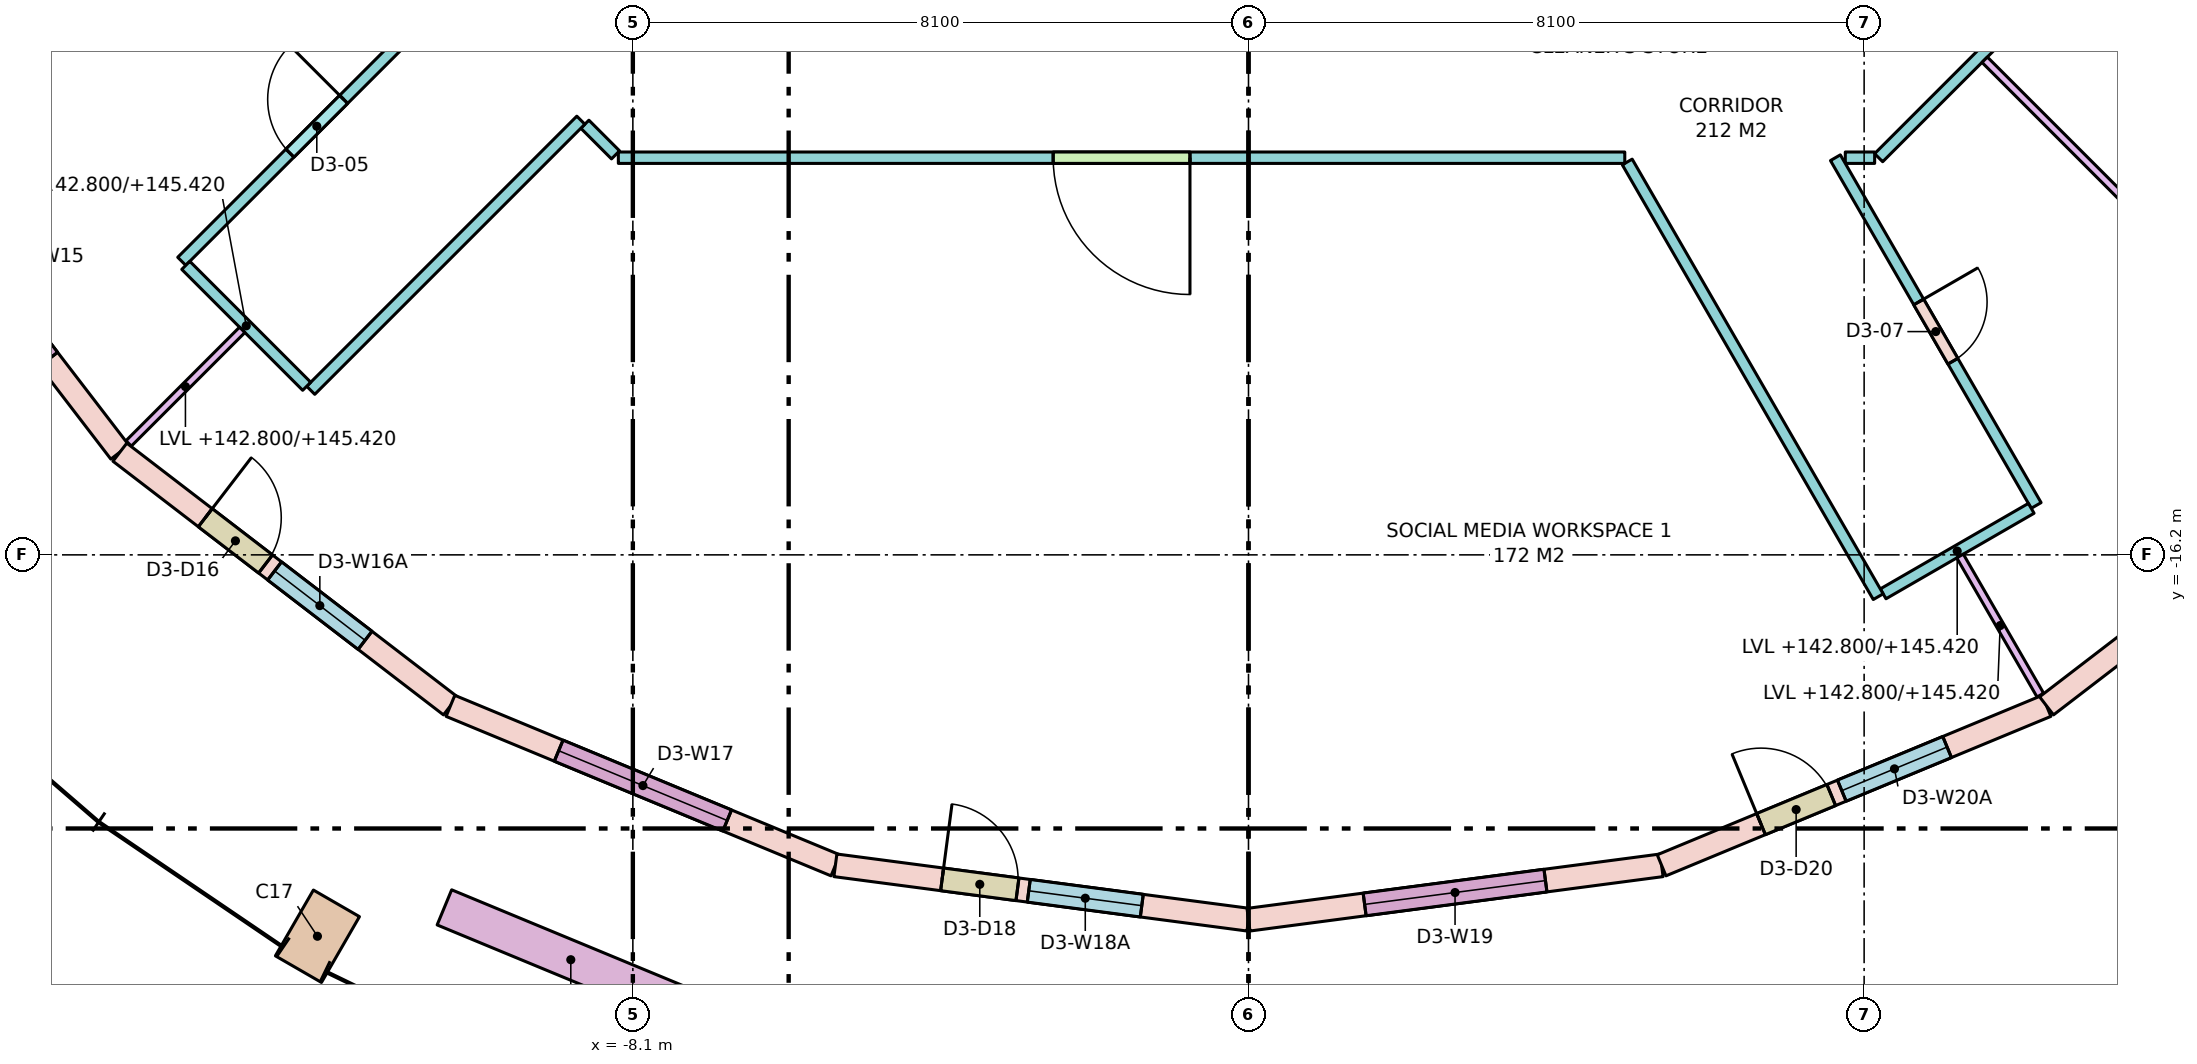
"""IFC4 building model, lengths in metres.
Left out: names, types, materials, properties, quantities, classifications, styles, units other than length and angle.
Written with IfcOpenShell. Run it as: python <this file> out.ifc"""

import sys

from ifc_helpers import new_model, si_unit, direction, frame, frame_2d, origin, origin_2d, place, context, subcontext, project, spatial, rectangle, extrude, element, fill, save


model = new_model("IFC4")
c1 = context("Model", 3, precision=1e-05, world=origin(), true_north=direction((0.0, 1.0)))
c2 = subcontext(c1, "Body", "Model", "MODEL_VIEW")
j1 = project(units=[si_unit("LENGTHUNIT", "METRE"), si_unit("PLANEANGLEUNIT", "RADIAN")], contexts=[c1])
p1 = place(None, origin())
s1 = spatial("IfcSite", under=j1, at=p1, CompositionType="ELEMENT")
p2 = place(p1, origin())
s2 = spatial("IfcBuilding", under=s1, at=p2, CompositionType="ELEMENT")
p3 = place(p2, frame((0.0, 0.0, 142.8)))
s3 = spatial("IfcBuildingStorey", under=s2, at=p3, CompositionType="ELEMENT", Elevation=142.8)
p4 = place(p3, frame((-12.25, -21.218, 0.0), z_axis=(0.0, 0.0, 1.0), x_axis=(0.866025403784, -0.5, 0.0)))
e1 = element("IfcColumn", 1, at=p4, inside=s3, PredefinedType="COLUMN", context=c2, shape_type="SweptSolid", body=[
    extrude(rectangle(XDim=0.7, YDim=1.0, at=origin_2d()), origin(), (0.0, 0.0, 1.0), 3.8),
])
p5 = place(p3, frame((-18.187, -10.5, 0.0), z_axis=(0.0, 0.0, 1.0), x_axis=(0.608784891166, -0.793335336593, 0.0)))
e2 = element("IfcWall", 2, at=p5, inside=s3, PredefinedType="STANDARD", context=c2, shape_type="SweptSolid", body=[
    extrude(rectangle(XDim=5.482, YDim=0.3, at=frame_2d((2.741, 0.0))), origin(), (0.0, 0.0, 1.0), 3.52),
])
p6 = place(p5, frame((1.541, 0.0, 0.8)))
e3 = element("IfcOpeningElement", 3, at=p6, cuts=e2, PredefinedType="OPENING", context=c2, shape_type="SweptSolid", body=[
    extrude(rectangle(XDim=2.4, YDim=2.5, at=frame_2d((1.2, 1.25))), frame((0.0, 0.16, 0.0), z_axis=(0.0, -1.0, 0.0), x_axis=(1.0, 0.0, 0.0)), (0.0, 0.0, 1.0), 0.32),
])
p7 = place(p3, frame((-14.849, -14.849, 0.0), z_axis=(0.0, 0.0, 1.0), x_axis=(0.793335336593, -0.608784891166, 0.0)))
e4 = element("IfcWall", 4, at=p7, inside=s3, PredefinedType="STANDARD", context=c2, shape_type="SweptSolid", body=[
    extrude(rectangle(XDim=5.482, YDim=0.3, at=frame_2d((2.741, 0.0))), origin(), (0.0, 0.0, 1.0), 3.52),
])
p8 = place(p7, frame((1.416, 0.0, 0.0)))
e5 = element("IfcOpeningElement", 5, at=p8, cuts=e4, PredefinedType="OPENING", context=c2, shape_type="SweptSolid", body=[
    extrude(rectangle(XDim=1.0, YDim=2.4, at=frame_2d((0.5, 1.2))), frame((0.0, 0.16, 0.0), z_axis=(0.0, -1.0, 0.0), x_axis=(1.0, 0.0, 0.0)), (0.0, 0.0, 1.0), 0.32),
])
p9 = place(p7, frame((2.566, 0.0, 0.8)))
e6 = element("IfcOpeningElement", 6, at=p9, cuts=e4, PredefinedType="OPENING", context=c2, shape_type="SweptSolid", body=[
    extrude(rectangle(XDim=1.5, YDim=2.5, at=frame_2d((0.75, 1.25))), frame((0.0, 0.16, 0.0), z_axis=(0.0, -1.0, 0.0), x_axis=(1.0, 0.0, 0.0)), (0.0, 0.0, 1.0), 0.32),
])
p10 = place(p3, frame((-10.5, -18.187, 0.0), z_axis=(0.0, 0.0, 1.0), x_axis=(0.923877333662, -0.382688740813, 0.0)))
e7 = element("IfcWall", 7, at=p10, inside=s3, PredefinedType="STANDARD", context=c2, shape_type="SweptSolid", body=[
    extrude(rectangle(XDim=5.482, YDim=0.3, at=frame_2d((2.741, 0.0))), origin(), (0.0, 0.0, 1.0), 3.52),
])
p11 = place(p10, frame((1.541, 0.0, 0.8)))
e8 = element("IfcOpeningElement", 8, at=p11, cuts=e7, PredefinedType="OPENING", context=c2, shape_type="SweptSolid", body=[
    extrude(rectangle(XDim=2.4, YDim=2.5, at=frame_2d((1.2, 1.25))), frame((0.0, 0.16, 0.0), z_axis=(0.0, -1.0, 0.0), x_axis=(1.0, 0.0, 0.0)), (0.0, 0.0, 1.0), 0.32),
])
p12 = place(p3, frame((-5.435, -20.284, 0.0), z_axis=(0.0, 0.0, 1.0), x_axis=(0.991444743541, -0.130527087244, 0.0)))
e9 = element("IfcWall", 9, at=p12, inside=s3, PredefinedType="STANDARD", context=c2, shape_type="SweptSolid", body=[
    extrude(rectangle(XDim=5.482, YDim=0.3, at=frame_2d((2.741, 0.0))), origin(), (0.0, 0.0, 1.0), 3.52),
])
p13 = place(p12, frame((1.416, 0.0, 0.0)))
e10 = element("IfcOpeningElement", 10, at=p13, cuts=e9, PredefinedType="OPENING", context=c2, shape_type="SweptSolid", body=[
    extrude(rectangle(XDim=1.0, YDim=2.4, at=frame_2d((0.5, 1.2))), frame((0.0, 0.16, 0.0), z_axis=(0.0, -1.0, 0.0), x_axis=(1.0, 0.0, 0.0)), (0.0, 0.0, 1.0), 0.32),
])
p14 = place(p12, frame((2.566, 0.0, 0.8)))
e11 = element("IfcOpeningElement", 11, at=p14, cuts=e9, PredefinedType="OPENING", context=c2, shape_type="SweptSolid", body=[
    extrude(rectangle(XDim=1.5, YDim=2.5, at=frame_2d((0.75, 1.25))), frame((0.0, 0.16, 0.0), z_axis=(0.0, -1.0, 0.0), x_axis=(1.0, 0.0, 0.0)), (0.0, 0.0, 1.0), 0.32),
])
p15 = place(p3, frame((0.0, -21.0, 0.0), z_axis=(0.0, 0.0, 1.0), x_axis=(0.991444743541, 0.130527087244, 0.0)))
e12 = element("IfcWall", 12, at=p15, inside=s3, PredefinedType="STANDARD", context=c2, shape_type="SweptSolid", body=[
    extrude(rectangle(XDim=5.482, YDim=0.3, at=frame_2d((2.741, 0.0))), origin(), (0.0, 0.0, 1.0), 3.52),
])
p16 = place(p15, frame((1.541, 0.0, 0.8)))
e13 = element("IfcOpeningElement", 13, at=p16, cuts=e12, PredefinedType="OPENING", context=c2, shape_type="SweptSolid", body=[
    extrude(rectangle(XDim=2.4, YDim=2.5, at=frame_2d((1.2, 1.25))), frame((0.0, 0.16, 0.0), z_axis=(0.0, -1.0, 0.0), x_axis=(1.0, 0.0, 0.0)), (0.0, 0.0, 1.0), 0.32),
])
p17 = place(p3, frame((5.435, -20.284, 0.0), z_axis=(0.0, 0.0, 1.0), x_axis=(0.923877333662, 0.382688740813, 0.0)))
e14 = element("IfcWall", 14, at=p17, inside=s3, PredefinedType="STANDARD", context=c2, shape_type="SweptSolid", body=[
    extrude(rectangle(XDim=5.482, YDim=0.3, at=frame_2d((2.741, 0.0))), origin(), (0.0, 0.0, 1.0), 3.52),
])
p18 = place(p17, frame((1.416, 0.0, 0.0)))
e15 = element("IfcOpeningElement", 15, at=p18, cuts=e14, PredefinedType="OPENING", context=c2, shape_type="SweptSolid", body=[
    extrude(rectangle(XDim=1.0, YDim=2.4, at=frame_2d((0.5, 1.2))), frame((0.0, 0.16, 0.0), z_axis=(0.0, -1.0, 0.0), x_axis=(1.0, 0.0, 0.0)), (0.0, 0.0, 1.0), 0.32),
])
p19 = place(p17, frame((2.566, 0.0, 0.8)))
e16 = element("IfcOpeningElement", 16, at=p19, cuts=e14, PredefinedType="OPENING", context=c2, shape_type="SweptSolid", body=[
    extrude(rectangle(XDim=1.5, YDim=2.5, at=frame_2d((0.75, 1.25))), frame((0.0, 0.16, 0.0), z_axis=(0.0, -1.0, 0.0), x_axis=(1.0, 0.0, 0.0)), (0.0, 0.0, 1.0), 0.32),
])
p20 = place(p3, frame((10.5, -18.187, 0.0), z_axis=(0.0, 0.0, 1.0), x_axis=(0.793335336593, 0.608784891166, 0.0)))
e17 = element("IfcWall", 17, at=p20, inside=s3, PredefinedType="STANDARD", context=c2, shape_type="SweptSolid", body=[
    extrude(rectangle(XDim=5.482, YDim=0.3, at=frame_2d((2.741, 0.0))), origin(), (0.0, 0.0, 1.0), 3.52),
])
p21 = place(p20, frame((1.541, 0.0, 0.8)))
e18 = element("IfcOpeningElement", 18, at=p21, cuts=e17, PredefinedType="OPENING", context=c2, shape_type="SweptSolid", body=[
    extrude(rectangle(XDim=2.4, YDim=2.5, at=frame_2d((1.2, 1.25))), frame((0.0, 0.16, 0.0), z_axis=(0.0, -1.0, 0.0), x_axis=(1.0, 0.0, 0.0)), (0.0, 0.0, 1.0), 0.32),
])
p22 = place(p3, frame((-10.58, -20.838, 0.0), z_axis=(0.0, 0.0, 1.0), x_axis=(0.923909393783, -0.382611332921, 0.0)))
e19 = element("IfcWall", 19, at=p22, inside=s3, PredefinedType="PARAPET", context=c2, shape_type="SweptSolid", body=[
    extrude(rectangle(XDim=3.6, YDim=0.5, at=frame_2d((1.8, 0.0))), origin(), (0.0, 0.0, 1.0), 0.9),
])
p23 = place(p3, frame((-14.035, -12.338, 0.0), z_axis=(0.0, 0.0, 1.0), x_axis=(0.707106781187, 0.707106781187, 0.0)))
e20 = element("IfcWall", 20, at=p23, inside=s3, PredefinedType="PARTITIONING", context=c2, shape_type="SweptSolid", body=[
    extrude(rectangle(XDim=5.026, YDim=0.15, at=frame_2d((2.513, 0.0))), origin(), (0.0, 0.0, 1.0), 3.52),
])
p24 = place(p23, frame((2.013, 0.0, 0.0)))
e21 = element("IfcOpeningElement", 21, at=p24, cuts=e20, PredefinedType="OPENING", context=c2, shape_type="SweptSolid", body=[
    extrude(rectangle(XDim=1.0, YDim=2.1, at=frame_2d((0.5, 1.05))), frame((0.0, 0.085, 0.0), z_axis=(0.0, -1.0, 0.0), x_axis=(1.0, 0.0, 0.0)), (0.0, 0.0, 1.0), 0.17),
])
p25 = place(p3, frame((12.938, -6.328, 0.0), z_axis=(0.0, 0.0, 1.0), x_axis=(-0.707088206597, -0.707125355289, 0.0)))
e22 = element("IfcWall", 22, at=p25, inside=s3, PredefinedType="PARTITIONING", context=c2, shape_type="SweptSolid", body=[
    extrude(rectangle(XDim=6.572, YDim=0.15, at=frame_2d((3.286, 0.0))), origin(), (0.0, 0.0, 1.0), 2.62),
])
p26 = place(p25, frame((2.398, 0.0, 0.0)))
e23 = element("IfcOpeningElement", 23, at=p26, cuts=e22, PredefinedType="OPENING", context=c2, shape_type="SweptSolid", body=[
    extrude(rectangle(XDim=0.9, YDim=2.1, at=frame_2d((0.45, 1.05))), frame((0.0, 0.085, 0.0), z_axis=(0.0, -1.0, 0.0), x_axis=(1.0, 0.0, 0.0)), (0.0, 0.0, 1.0), 0.17),
])
p27 = place(p3, frame((8.238, -10.975, 0.0), z_axis=(0.0, 0.0, 1.0), x_axis=(-1.0, 0.0, 0.0)))
e24 = element("IfcWall", 24, at=p27, inside=s3, PredefinedType="PARTITIONING", context=c2, shape_type="SweptSolid", body=[
    extrude(rectangle(XDim=0.386, YDim=0.15, at=frame_2d((0.193, 0.0))), origin(), (0.0, 0.0, 1.0), 3.52),
])
p28 = place(p3, frame((7.722, -10.975, 0.0), z_axis=(0.0, 0.0, 1.0), x_axis=(0.499981143329, -0.866036290415, 0.0)))
e25 = element("IfcWall", 25, at=p28, inside=s3, PredefinedType="PARTITIONING", context=c2, shape_type="SweptSolid", body=[
    extrude(rectangle(XDim=5.283, YDim=0.15, at=frame_2d((2.642, 0.0))), origin(), (0.0, 0.0, 1.0), 3.52),
])
p29 = place(p28, frame((2.191, 0.0, 0.0)))
e26 = element("IfcOpeningElement", 26, at=p29, cuts=e25, PredefinedType="OPENING", context=c2, shape_type="SweptSolid", body=[
    extrude(rectangle(XDim=0.9, YDim=2.1, at=frame_2d((0.45, 1.05))), frame((0.0, 0.085, 0.0), z_axis=(0.0, -1.0, 0.0), x_axis=(1.0, 0.0, 0.0)), (0.0, 0.0, 1.0), 0.17),
])
p30 = place(p3, frame((10.299, -15.588, 0.0), z_axis=(0.0, 0.0, 1.0), x_axis=(-0.866017533419, -0.500013631625, 0.0)))
e27 = element("IfcWall", 27, at=p30, inside=s3, PredefinedType="PARTITIONING", context=c2, shape_type="SweptSolid", body=[
    extrude(rectangle(XDim=2.25, YDim=0.15, at=frame_2d((1.125, 0.0))), origin(), (0.0, 0.0, 1.0), 2.62),
])
p31 = place(p3, frame((8.285, -16.75, 0.0), z_axis=(0.0, 0.0, 1.0), x_axis=(-0.499988075443, 0.866032288321, 0.0)))
e28 = element("IfcWall", 28, at=p31, inside=s3, PredefinedType="PARTITIONING", context=c2, shape_type="SweptSolid", body=[
    extrude(rectangle(XDim=6.604, YDim=0.15, at=frame_2d((3.302, 0.0))), origin(), (0.0, 0.0, 1.0), 3.52),
])
p32 = place(p3, frame((4.951, -10.975, 0.0), z_axis=(0.0, 0.0, 1.0), x_axis=(-1.0, 0.0, 0.0)))
e29 = element("IfcWall", 29, at=p32, inside=s3, PredefinedType="PARTITIONING", context=c2, shape_type="SweptSolid", body=[
    extrude(rectangle(XDim=13.242, YDim=0.15, at=frame_2d((6.621, 0.0))), origin(), (0.0, 0.0, 1.0), 2.62),
])
p33 = place(p32, frame((5.721, 0.0, 0.0)))
e30 = element("IfcOpeningElement", 30, at=p33, cuts=e29, PredefinedType="OPENING", context=c2, shape_type="SweptSolid", body=[
    extrude(rectangle(XDim=1.8, YDim=2.1, at=frame_2d((0.9, 1.05))), frame((0.0, 0.085, 0.0), z_axis=(0.0, -1.0, 0.0), x_axis=(1.0, 0.0, 0.0)), (0.0, 0.0, 1.0), 0.17),
])
p34 = place(p3, frame((-8.328, -10.938, 0.0), z_axis=(0.0, 0.0, 1.0), x_axis=(-0.707106781187, 0.707106781187, 0.0)))
e31 = element("IfcWall", 31, at=p34, inside=s3, PredefinedType="PARTITIONING", context=c2, shape_type="SweptSolid", body=[
    extrude(rectangle(XDim=0.571, YDim=0.15, at=frame_2d((0.285, 0.0))), origin(), (0.0, 0.0, 1.0), 3.52),
])
p35 = place(p3, frame((-8.784, -10.481, 0.0), z_axis=(0.0, 0.0, 1.0), x_axis=(-0.707106781187, -0.707106781187, 0.0)))
e32 = element("IfcWall", 32, at=p35, inside=s3, PredefinedType="PARTITIONING", context=c2, shape_type="SweptSolid", body=[
    extrude(rectangle(XDim=5.026, YDim=0.15, at=frame_2d((2.513, 0.0))), origin(), (0.0, 0.0, 1.0), 3.52),
])
p36 = place(p3, frame((-12.391, -13.982, 0.0), z_axis=(0.0, 0.0, 1.0), x_axis=(-0.707106781187, 0.707106781187, 0.0)))
e33 = element("IfcWall", 33, at=p36, inside=s3, PredefinedType="PARTITIONING", context=c2, shape_type="SweptSolid", body=[
    extrude(rectangle(XDim=2.25, YDim=0.15, at=frame_2d((1.125, 0.0))), origin(), (0.0, 0.0, 1.0), 2.62),
])
p37 = place(p3, frame((-13.24, -13.24, 0.0), z_axis=(0.0, 0.0, 1.0), x_axis=(-0.707106781187, -0.707106781187, 0.0)))
e34 = element("IfcWall", 34, at=p37, inside=s3, PredefinedType="PARTITIONING", context=c2, shape_type="SweptSolid", body=[
    extrude(rectangle(XDim=2.113, YDim=0.1, at=frame_2d((1.057, 0.0))), origin(), (0.0, 0.0, 1.0), 2.62),
])
p38 = place(p3, frame((9.362, -16.215, 0.0), z_axis=(0.0, 0.0, 1.0), x_axis=(0.500015802937, -0.866016279763, 0.0)))
e35 = element("IfcWall", 35, at=p38, inside=s3, PredefinedType="PARTITIONING", context=c2, shape_type="SweptSolid", body=[
    extrude(rectangle(XDim=2.113, YDim=0.1, at=frame_2d((1.057, 0.0))), origin(), (0.0, 0.0, 1.0), 2.62),
])
p39 = place(p3, frame((9.686, -9.686, 0.0), z_axis=(0.0, 0.0, 1.0), x_axis=(0.707106781187, -0.707106781187, 0.0)))
e36 = element("IfcWall", 36, at=p39, inside=s3, PredefinedType="PARTITIONING", context=c2, shape_type="SweptSolid", body=[
    extrude(rectangle(XDim=7.139, YDim=0.1, at=frame_2d((3.569, 0.0))), origin(), (0.0, 0.0, 1.0), 2.62),
])
p40 = place(p8, origin())
e37 = element("IfcDoor", 37, at=p40, inside=s3, OperationType="SINGLE_SWING_LEFT", PredefinedType="DOOR", context=c2, shape_type="SweptSolid", body=[
    extrude(rectangle(XDim=1.0, YDim=2.4, at=frame_2d((0.5, 1.2))), frame((0.0, 0.025, 0.0), z_axis=(0.0, -1.0, 0.0), x_axis=(1.0, 0.0, 0.0)), (0.0, 0.0, 1.0), 0.05),
])
fill(e5, e37)
p41 = place(p9, origin())
e38 = element("IfcWindow", 38, at=p41, inside=s3, PartitioningType="SINGLE_PANEL", PredefinedType="WINDOW", context=c2, shape_type="SweptSolid", body=[
    extrude(rectangle(XDim=1.5, YDim=2.5, at=frame_2d((0.75, 1.25))), frame((0.0, 0.03, 0.0), z_axis=(0.0, -1.0, 0.0), x_axis=(1.0, 0.0, 0.0)), (0.0, 0.0, 1.0), 0.06),
])
fill(e6, e38)
p42 = place(p11, origin())
e39 = element("IfcWindow", 39, at=p42, inside=s3, PartitioningType="SINGLE_PANEL", PredefinedType="WINDOW", context=c2, shape_type="SweptSolid", body=[
    extrude(rectangle(XDim=2.4, YDim=2.5, at=frame_2d((1.2, 1.25))), frame((0.0, 0.03, 0.0), z_axis=(0.0, -1.0, 0.0), x_axis=(1.0, 0.0, 0.0)), (0.0, 0.0, 1.0), 0.06),
])
fill(e8, e39)
p43 = place(p13, origin())
e40 = element("IfcDoor", 40, at=p43, inside=s3, OperationType="SINGLE_SWING_LEFT", PredefinedType="DOOR", context=c2, shape_type="SweptSolid", body=[
    extrude(rectangle(XDim=1.0, YDim=2.4, at=frame_2d((0.5, 1.2))), frame((0.0, 0.025, 0.0), z_axis=(0.0, -1.0, 0.0), x_axis=(1.0, 0.0, 0.0)), (0.0, 0.0, 1.0), 0.05),
])
fill(e10, e40)
p44 = place(p14, origin())
e41 = element("IfcWindow", 41, at=p44, inside=s3, PartitioningType="SINGLE_PANEL", PredefinedType="WINDOW", context=c2, shape_type="SweptSolid", body=[
    extrude(rectangle(XDim=1.5, YDim=2.5, at=frame_2d((0.75, 1.25))), frame((0.0, 0.03, 0.0), z_axis=(0.0, -1.0, 0.0), x_axis=(1.0, 0.0, 0.0)), (0.0, 0.0, 1.0), 0.06),
])
fill(e11, e41)
p45 = place(p16, origin())
e42 = element("IfcWindow", 42, at=p45, inside=s3, PartitioningType="SINGLE_PANEL", PredefinedType="WINDOW", context=c2, shape_type="SweptSolid", body=[
    extrude(rectangle(XDim=2.4, YDim=2.5, at=frame_2d((1.2, 1.25))), frame((0.0, 0.03, 0.0), z_axis=(0.0, -1.0, 0.0), x_axis=(1.0, 0.0, 0.0)), (0.0, 0.0, 1.0), 0.06),
])
fill(e13, e42)
p46 = place(p18, origin())
e43 = element("IfcDoor", 43, at=p46, inside=s3, OperationType="SINGLE_SWING_LEFT", PredefinedType="DOOR", context=c2, shape_type="SweptSolid", body=[
    extrude(rectangle(XDim=1.0, YDim=2.4, at=frame_2d((0.5, 1.2))), frame((0.0, 0.025, 0.0), z_axis=(0.0, -1.0, 0.0), x_axis=(1.0, 0.0, 0.0)), (0.0, 0.0, 1.0), 0.05),
])
fill(e15, e43)
p47 = place(p19, origin())
e44 = element("IfcWindow", 44, at=p47, inside=s3, PartitioningType="SINGLE_PANEL", PredefinedType="WINDOW", context=c2, shape_type="SweptSolid", body=[
    extrude(rectangle(XDim=1.5, YDim=2.5, at=frame_2d((0.75, 1.25))), frame((0.0, 0.03, 0.0), z_axis=(0.0, -1.0, 0.0), x_axis=(1.0, 0.0, 0.0)), (0.0, 0.0, 1.0), 0.06),
])
fill(e16, e44)
p48 = place(p24, origin())
e45 = element("IfcDoor", 45, at=p48, inside=s3, OperationType="SINGLE_SWING_RIGHT", PredefinedType="DOOR", context=c2, shape_type="SweptSolid", body=[
    extrude(rectangle(XDim=1.0, YDim=2.1, at=frame_2d((0.5, 1.05))), frame((0.0, 0.025, 0.0), z_axis=(0.0, -1.0, 0.0), x_axis=(1.0, 0.0, 0.0)), (0.0, 0.0, 1.0), 0.05),
])
fill(e21, e45)
p49 = place(p33, origin())
e46 = element("IfcDoor", 46, at=p49, inside=s3, OperationType="DOUBLE_DOOR_SINGLE_SWING", PredefinedType="DOOR", context=c2, shape_type="SweptSolid", body=[
    extrude(rectangle(XDim=1.8, YDim=2.1, at=frame_2d((0.9, 1.05))), frame((0.0, 0.025, 0.0), z_axis=(0.0, -1.0, 0.0), x_axis=(1.0, 0.0, 0.0)), (0.0, 0.0, 1.0), 0.05),
])
fill(e30, e46)
p50 = place(p29, origin())
e47 = element("IfcDoor", 47, at=p50, inside=s3, OperationType="SINGLE_SWING_LEFT", PredefinedType="DOOR", context=c2, shape_type="SweptSolid", body=[
    extrude(rectangle(XDim=0.9, YDim=2.1, at=frame_2d((0.45, 1.05))), frame((0.0, 0.025, 0.0), z_axis=(0.0, -1.0, 0.0), x_axis=(1.0, 0.0, 0.0)), (0.0, 0.0, 1.0), 0.05),
])
fill(e26, e47)
save(model, sys.argv[1])
